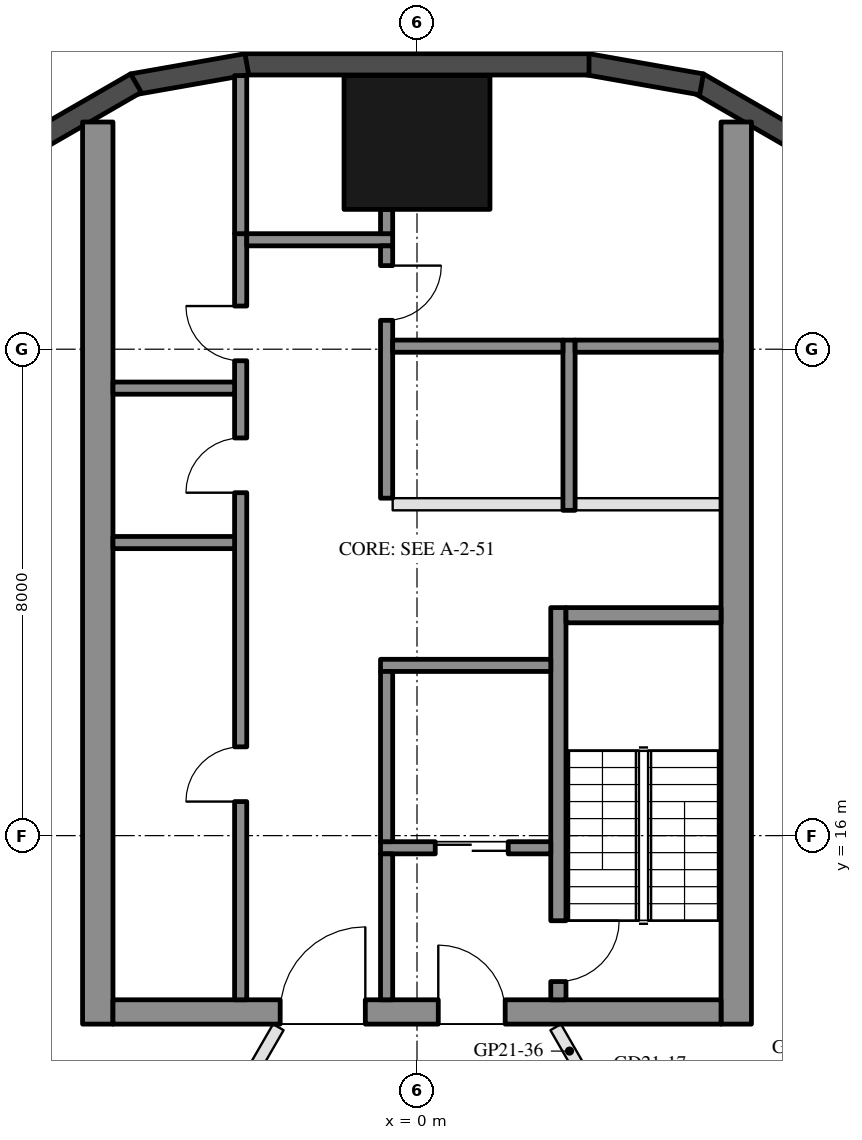
"""IFC4 building model, lengths in metres.
Left out: names, types, materials, properties, quantities, classifications, styles, units other than length and angle.
Written with IfcOpenShell. Run it as: python <this file> out.ifc"""

import sys

from ifc_helpers import new_model, si_unit, direction, frame, frame_2d, origin, origin_2d, place, context, subcontext, project, spatial, rectangle, hollow_rectangle, extrude, element, fill, save


model = new_model("IFC4")
c1 = context("Model", 3, precision=1e-05, world=origin(), true_north=direction((0.0, 1.0)))
c2 = subcontext(c1, "Body", "Model", "MODEL_VIEW")
j1 = project(units=[si_unit("LENGTHUNIT", "METRE"), si_unit("PLANEANGLEUNIT", "RADIAN")], contexts=[c1])
p1 = place(None, origin())
s1 = spatial("IfcSite", under=j1, at=p1, CompositionType="ELEMENT")
p2 = place(p1, origin())
s2 = spatial("IfcBuilding", under=s1, at=p2, CompositionType="ELEMENT")
p3 = place(p2, frame((0.0, 0.0, 220.6)))
s3 = spatial("IfcBuildingStorey", under=s2, at=p3, CompositionType="ELEMENT", Elevation=220.6)
p4 = place(p3, frame((0.0, 27.4, 0.0), z_axis=(0.0, 0.0, 1.0), x_axis=(1.0, 0.0, 0.0)))
e1 = element("IfcColumn", 1, at=p4, inside=s3, PredefinedType="COLUMN", context=c2, shape_type="SweptSolid", body=[
    extrude(hollow_rectangle(XDim=2.4, YDim=2.2, WallThickness=0.06, at=origin_2d()), origin(), (0.0, 0.0, 1.0), 3.7),
])
for number, where, z_axis, x_axis in (
    (2, (6.277, 27.422, 0.0), (0.0, 0.0, 1.0), (-0.866, 0.5, 0.0)),
    (3, (4.68, 28.356, 0.0), (0.0, 0.0, 1.0), (-0.985, 0.174, 0.0)),
):
    element("IfcWall", number, at=place(p3, frame(where, z_axis=z_axis, x_axis=x_axis)), inside=s3, PredefinedType="SOLIDWALL", context=c2, shape_type="SweptSolid", body=[
        extrude(rectangle(XDim=1.91, YDim=0.35, at=frame_2d((0.955, 0.0))), origin(), (0.0, 0.0, 1.0), 3.55),
    ])
p5 = place(p3, frame((2.829, 28.685, 0.0), z_axis=(0.0, 0.0, 1.0), x_axis=(-1.0, 0.0, 0.0)))
e4 = element("IfcWall", 4, at=p5, inside=s3, PredefinedType="SOLIDWALL", context=c2, shape_type="SweptSolid", body=[
    extrude(rectangle(XDim=5.658, YDim=0.35, at=frame_2d((2.829, 0.0))), origin(), (0.0, 0.0, 1.0), 3.55),
])
for number, where, z_axis, x_axis in (
    (5, (-2.799, 28.688, 0.0), (0.0, 0.0, 1.0), (-0.985, -0.174, 0.0)),
    (6, (-4.623, 28.377, 0.0), (0.0, 0.0, 1.0), (-0.866, -0.5, 0.0)),
):
    element("IfcWall", number, at=place(p3, frame(where, z_axis=z_axis, x_axis=x_axis)), inside=s3, PredefinedType="SOLIDWALL", context=c2, shape_type="SweptSolid", body=[
        extrude(rectangle(XDim=1.91, YDim=0.35, at=frame_2d((0.955, 0.0))), origin(), (0.0, 0.0, 1.0), 3.55),
    ])
for number, where, z_axis, x_axis in (
    (7, (5.25, 12.9, 0.0), (0.0, 0.0, 1.0), (0.0, 1.0, 0.0)),
    (8, (-5.25, 12.9, 0.0), (0.0, 0.0, 1.0), (0.0, 1.0, 0.0)),
):
    element("IfcWall", number, at=place(p3, frame(where, z_axis=z_axis, x_axis=x_axis)), inside=s3, PredefinedType="SHEAR", context=c2, shape_type="SweptSolid", body=[
        extrude(rectangle(XDim=14.837, YDim=0.5, at=frame_2d((7.418, 0.0))), origin(), (0.0, 0.0, 1.0), 3.5),
    ])
p6 = place(p3, frame((5.0, 13.1, 0.0), z_axis=(0.0, 0.0, 1.0), x_axis=(-1.0, 0.0, 0.0)))
e9 = element("IfcWall", 9, at=p6, inside=s3, PredefinedType="SHEAR", context=c2, shape_type="SweptSolid", body=[
    extrude(rectangle(XDim=10.0, YDim=0.4, at=frame_2d((5.0, 0.0))), origin(), (0.0, 0.0, 1.0), 3.5),
])
p7 = place(p6, frame((3.55, 0.0, 0.0)))
e10 = element("IfcOpeningElement", 10, at=p7, cuts=e9, PredefinedType="OPENING", context=c2, shape_type="SweptSolid", body=[
    extrude(rectangle(XDim=1.1, YDim=2.1, at=frame_2d((0.55, 1.05))), frame((0.0, 0.21, 0.0), z_axis=(0.0, -1.0, 0.0), x_axis=(1.0, 0.0, 0.0)), (0.0, 0.0, 1.0), 0.42),
])
p8 = place(p6, frame((5.85, 0.0, 0.0)))
e11 = element("IfcOpeningElement", 11, at=p8, cuts=e9, PredefinedType="OPENING", context=c2, shape_type="SweptSolid", body=[
    extrude(rectangle(XDim=1.4, YDim=2.1, at=frame_2d((0.7, 1.05))), frame((0.0, 0.21, 0.0), z_axis=(0.0, -1.0, 0.0), x_axis=(1.0, 0.0, 0.0)), (0.0, 0.0, 1.0), 0.42),
])
p9 = place(p3, frame((2.325, 13.3, 0.0), z_axis=(0.0, 0.0, 1.0), x_axis=(0.0, 1.0, 0.0)))
e12 = element("IfcWall", 12, at=p9, inside=s3, PredefinedType="SHEAR", context=c2, shape_type="SweptSolid", body=[
    extrude(rectangle(XDim=6.45, YDim=0.25, at=frame_2d((3.225, 0.0))), origin(), (0.0, 0.0, 1.0), 3.5),
])
p10 = place(p9, frame((0.3, 0.0, 0.0)))
e13 = element("IfcOpeningElement", 13, at=p10, cuts=e12, PredefinedType="OPENING", context=c2, shape_type="SweptSolid", body=[
    extrude(rectangle(XDim=1.0, YDim=2.1, at=frame_2d((0.5, 1.05))), frame((0.0, 0.135, 0.0), z_axis=(0.0, -1.0, 0.0), x_axis=(1.0, 0.0, 0.0)), (0.0, 0.0, 1.0), 0.27),
])
p11 = place(p3, frame((5.0, 19.625, 0.0), z_axis=(0.0, 0.0, 1.0), x_axis=(-1.0, 0.0, 0.0)))
e14 = element("IfcWall", 14, at=p11, inside=s3, PredefinedType="SHEAR", context=c2, shape_type="SweptSolid", body=[
    extrude(rectangle(XDim=2.55, YDim=0.25, at=frame_2d((1.275, 0.0))), origin(), (0.0, 0.0, 1.0), 3.5),
])
p12 = place(p3, frame((2.2, 18.8, 0.0), z_axis=(0.0, 0.0, 1.0), x_axis=(-1.0, 0.0, 0.0)))
e15 = element("IfcWall", 15, at=p12, inside=s3, PredefinedType="SHEAR", context=c2, shape_type="SweptSolid", body=[
    extrude(rectangle(XDim=2.8, YDim=0.2, at=frame_2d((1.4, 0.0))), origin(), (0.0, 0.0, 1.0), 3.5),
])
p13 = place(p3, frame((2.2, 15.8, 0.0), z_axis=(0.0, 0.0, 1.0), x_axis=(-1.0, 0.0, 0.0)))
e16 = element("IfcWall", 16, at=p13, inside=s3, PredefinedType="SHEAR", context=c2, shape_type="SweptSolid", body=[
    extrude(rectangle(XDim=2.8, YDim=0.2, at=frame_2d((1.4, 0.0))), origin(), (0.0, 0.0, 1.0), 3.5),
])
p14 = place(p13, frame((0.7, 0.0, 0.0)))
e17 = element("IfcOpeningElement", 17, at=p14, cuts=e16, PredefinedType="OPENING", context=c2, shape_type="SweptSolid", body=[
    extrude(rectangle(XDim=1.2, YDim=2.1, at=frame_2d((0.6, 1.05))), frame((0.0, 0.11, 0.0), z_axis=(0.0, -1.0, 0.0), x_axis=(1.0, 0.0, 0.0)), (0.0, 0.0, 1.0), 0.22),
])
p15 = place(p3, frame((-0.5, 15.9, 0.0), z_axis=(0.0, 0.0, 1.0), x_axis=(0.0, 1.0, 0.0)))
e18 = element("IfcWall", 18, at=p15, inside=s3, PredefinedType="SHEAR", context=c2, shape_type="SweptSolid", body=[
    extrude(rectangle(XDim=2.8, YDim=0.2, at=frame_2d((1.4, 0.0))), origin(), (0.0, 0.0, 1.0), 3.5),
])
p16 = place(p3, frame((-0.5, 13.3, 0.0), z_axis=(0.0, 0.0, 1.0), x_axis=(0.0, 1.0, 0.0)))
e19 = element("IfcWall", 19, at=p16, inside=s3, PredefinedType="SHEAR", context=c2, shape_type="SweptSolid", body=[
    extrude(rectangle(XDim=2.4, YDim=0.2, at=frame_2d((1.2, 0.0))), origin(), (0.0, 0.0, 1.0), 3.5),
])
p17 = place(p3, frame((-2.9, 13.3, 0.0), z_axis=(0.0, 0.0, 1.0), x_axis=(0.0, 1.0, 0.0)))
e20 = element("IfcWall", 20, at=p17, inside=s3, PredefinedType="SHEAR", context=c2, shape_type="SweptSolid", body=[
    extrude(rectangle(XDim=12.6, YDim=0.2, at=frame_2d((6.3, 0.0))), origin(), (0.0, 0.0, 1.0), 3.5),
])
p18 = place(p17, frame((3.26, 0.0, 0.0)))
e21 = element("IfcOpeningElement", 21, at=p18, cuts=e20, PredefinedType="OPENING", context=c2, shape_type="SweptSolid", body=[
    extrude(rectangle(XDim=0.9, YDim=2.1, at=frame_2d((0.45, 1.05))), frame((0.0, 0.11, 0.0), z_axis=(0.0, -1.0, 0.0), x_axis=(1.0, 0.0, 0.0)), (0.0, 0.0, 1.0), 0.22),
])
p19 = place(p17, frame((8.34, 0.0, 0.0)))
e22 = element("IfcOpeningElement", 22, at=p19, cuts=e20, PredefinedType="OPENING", context=c2, shape_type="SweptSolid", body=[
    extrude(rectangle(XDim=0.9, YDim=2.1, at=frame_2d((0.45, 1.05))), frame((0.0, 0.11, 0.0), z_axis=(0.0, -1.0, 0.0), x_axis=(1.0, 0.0, 0.0)), (0.0, 0.0, 1.0), 0.22),
])
p20 = place(p17, frame((10.51, 0.0, 0.0)))
e23 = element("IfcOpeningElement", 23, at=p20, cuts=e20, PredefinedType="OPENING", context=c2, shape_type="SweptSolid", body=[
    extrude(rectangle(XDim=0.9, YDim=2.1, at=frame_2d((0.45, 1.05))), frame((0.0, 0.11, 0.0), z_axis=(0.0, -1.0, 0.0), x_axis=(1.0, 0.0, 0.0)), (0.0, 0.0, 1.0), 0.22),
])
p21 = place(p3, frame((-0.4, 25.8, 0.0), z_axis=(0.0, 0.0, 1.0), x_axis=(-1.0, 0.0, 0.0)))
e24 = element("IfcWall", 24, at=p21, inside=s3, PredefinedType="SHEAR", context=c2, shape_type="SweptSolid", body=[
    extrude(rectangle(XDim=2.4, YDim=0.2, at=frame_2d((1.2, 0.0))), origin(), (0.0, 0.0, 1.0), 3.5),
])
p22 = place(p3, frame((-0.5, 21.55, 0.0), z_axis=(0.0, 0.0, 1.0), x_axis=(0.0, 1.0, 0.0)))
e25 = element("IfcWall", 25, at=p22, inside=s3, PredefinedType="SHEAR", context=c2, shape_type="SweptSolid", body=[
    extrude(rectangle(XDim=4.15, YDim=0.2, at=frame_2d((2.075, 0.0))), origin(), (0.0, 0.0, 1.0), 3.5),
])
p23 = place(p22, frame((2.925, 0.0, 0.0)))
e26 = element("IfcOpeningElement", 26, at=p23, cuts=e25, PredefinedType="OPENING", context=c2, shape_type="SweptSolid", body=[
    extrude(rectangle(XDim=0.9, YDim=2.1, at=frame_2d((0.45, 1.05))), frame((0.0, 0.11, 0.0), z_axis=(0.0, -1.0, 0.0), x_axis=(1.0, 0.0, 0.0)), (0.0, 0.0, 1.0), 0.22),
])
for number, where, z_axis, x_axis in (
    (27, (-3.0, 20.82, 0.0), (0.0, 0.0, 1.0), (-1.0, 0.0, 0.0)),
    (28, (-3.0, 23.36, 0.0), (0.0, 0.0, 1.0), (-1.0, 0.0, 0.0)),
):
    element("IfcWall", number, at=place(p3, frame(where, z_axis=z_axis, x_axis=x_axis)), inside=s3, PredefinedType="SHEAR", context=c2, shape_type="SweptSolid", body=[
        extrude(rectangle(XDim=2.0, YDim=0.2, at=frame_2d((1.0, 0.0))), origin(), (0.0, 0.0, 1.0), 3.5),
    ])
p24 = place(p3, frame((-0.5, 25.9, 0.0), z_axis=(0.0, 0.0, 1.0), x_axis=(0.0, 1.0, 0.0)))
e29 = element("IfcWall", 29, at=p24, inside=s3, PredefinedType="SHEAR", context=c2, shape_type="SweptSolid", body=[
    extrude(rectangle(XDim=0.4, YDim=0.2, at=frame_2d((0.2, 0.0))), origin(), (0.0, 0.0, 1.0), 3.5),
])
p25 = place(p3, frame((-2.9, 25.9, 0.0), z_axis=(0.0, 0.0, 1.0), x_axis=(0.0, 1.0, 0.0)))
e30 = element("IfcWall", 30, at=p25, inside=s3, PredefinedType="SHEAR", context=c2, shape_type="SweptSolid", body=[
    extrude(rectangle(XDim=2.6, YDim=0.2, at=frame_2d((1.3, 0.0))), origin(), (0.0, 0.0, 1.0), 3.5),
])
p26 = place(p3, frame((2.5, 21.35, 0.0), z_axis=(0.0, 0.0, 1.0), x_axis=(0.0, 1.0, 0.0)))
e31 = element("IfcWall", 31, at=p26, inside=s3, PredefinedType="SHEAR", context=c2, shape_type="SweptSolid", body=[
    extrude(rectangle(XDim=2.8, YDim=0.2, at=frame_2d((1.4, 0.0))), origin(), (0.0, 0.0, 1.0), 3.5),
])
p27 = place(p3, frame((5.0, 24.05, 0.0), z_axis=(0.0, 0.0, 1.0), x_axis=(-1.0, 0.0, 0.0)))
e32 = element("IfcWall", 32, at=p27, inside=s3, PredefinedType="SHEAR", context=c2, shape_type="SweptSolid", body=[
    extrude(rectangle(XDim=2.4, YDim=0.2, at=frame_2d((1.2, 0.0))), origin(), (0.0, 0.0, 1.0), 3.5),
])
p28 = place(p3, frame((2.4, 24.05, 0.0), z_axis=(0.0, 0.0, 1.0), x_axis=(-1.0, 0.0, 0.0)))
e33 = element("IfcWall", 33, at=p28, inside=s3, PredefinedType="SHEAR", context=c2, shape_type="SweptSolid", body=[
    extrude(rectangle(XDim=2.8, YDim=0.2, at=frame_2d((1.4, 0.0))), origin(), (0.0, 0.0, 1.0), 3.5),
])
p29 = place(p3, frame((5.0, 21.45, 0.0), z_axis=(0.0, 0.0, 1.0), x_axis=(-1.0, 0.0, 0.0)))
e34 = element("IfcWall", 34, at=p29, inside=s3, PredefinedType="PARTITIONING", context=c2, shape_type="SweptSolid", body=[
    extrude(rectangle(XDim=2.4, YDim=0.2, at=frame_2d((1.2, 0.0))), origin(), (0.0, 0.0, 1.0), 3.5),
])
p30 = place(p3, frame((2.4, 21.45, 0.0), z_axis=(0.0, 0.0, 1.0), x_axis=(-1.0, 0.0, 0.0)))
e35 = element("IfcWall", 35, at=p30, inside=s3, PredefinedType="PARTITIONING", context=c2, shape_type="SweptSolid", body=[
    extrude(rectangle(XDim=2.8, YDim=0.2, at=frame_2d((1.4, 0.0))), origin(), (0.0, 0.0, 1.0), 3.5),
])
p31 = place(p3, frame((13.647, 14.923, 0.0), z_axis=(0.0, 0.0, 1.0), x_axis=(-0.866027479907, -0.499996404033, 0.0)))
e36 = element("IfcWall", 36, at=p31, inside=s3, PredefinedType="PARTITIONING", context=c2, shape_type="SweptSolid", body=[
    extrude(rectangle(XDim=10.98, YDim=0.2, at=frame_2d((5.49, 0.0))), origin(), (0.0, 0.0, 1.0), 3.06),
])
p32 = place(p3, frame((-13.672, 13.08, 0.0), z_axis=(0.0, 0.0, 1.0), x_axis=(0.912311972773, -0.409495866077, 0.0)))
e37 = element("IfcWall", 37, at=p32, inside=s3, PredefinedType="PARTITIONING", context=c2, shape_type="SweptSolid", body=[
    extrude(rectangle(XDim=10.132, YDim=0.2, at=frame_2d((5.066, 0.0))), origin(), (0.0, 0.0, 1.0), 3.06),
])
p33 = place(p3, frame((2.281, 12.85, 0.0), z_axis=(0.0, 0.0, 1.0), x_axis=(0.499979074716, -0.866037484666, 0.0)))
e38 = element("IfcWall", 38, at=p33, inside=s3, PredefinedType="PARTITIONING", context=c2, shape_type="SweptSolid", body=[
    extrude(rectangle(XDim=3.788, YDim=0.2, at=frame_2d((1.894, 0.0))), origin(), (0.0, 0.0, 1.0), 2.95),
])
p34 = place(p33, frame((1.394, 0.0, 0.0)))
e39 = element("IfcOpeningElement", 39, at=p34, cuts=e38, PredefinedType="OPENING", context=c2, shape_type="SweptSolid", body=[
    extrude(rectangle(XDim=1.0, YDim=2.1, at=frame_2d((0.5, 1.05))), frame((0.0, 0.11, 0.0), z_axis=(0.0, -1.0, 0.0), x_axis=(1.0, 0.0, 0.0)), (0.0, 0.0, 1.0), 0.22),
])
p35 = place(p3, frame((-4.469, 9.059, 0.0), z_axis=(0.0, 0.0, 1.0), x_axis=(0.499996027077, 0.86602769754, 0.0)))
e40 = element("IfcWall", 40, at=p35, inside=s3, PredefinedType="PARTITIONING", context=c2, shape_type="SweptSolid", body=[
    extrude(rectangle(XDim=4.377, YDim=0.2, at=frame_2d((2.189, 0.0))), origin(), (0.0, 0.0, 1.0), 2.95),
])
p36 = place(p35, frame((1.689, 0.0, 0.0)))
e41 = element("IfcOpeningElement", 41, at=p36, cuts=e40, PredefinedType="OPENING", context=c2, shape_type="SweptSolid", body=[
    extrude(rectangle(XDim=1.0, YDim=2.1, at=frame_2d((0.5, 1.05))), frame((0.0, 0.11, 0.0), z_axis=(0.0, -1.0, 0.0), x_axis=(1.0, 0.0, 0.0)), (0.0, 0.0, 1.0), 0.22),
])
p37 = place(p14, origin())
e42 = element("IfcDoor", 42, at=p37, inside=s3, OperationType="DOUBLE_DOOR_SLIDING", PredefinedType="DOOR", context=c2, shape_type="SweptSolid", body=[
    extrude(rectangle(XDim=1.2, YDim=2.1, at=frame_2d((0.6, 1.05))), frame((0.0, 0.025, 0.0), z_axis=(0.0, -1.0, 0.0), x_axis=(1.0, 0.0, 0.0)), (0.0, 0.0, 1.0), 0.05),
])
fill(e17, e42)
p38 = place(p18, origin())
e43 = element("IfcDoor", 43, at=p38, inside=s3, OperationType="SINGLE_SWING_LEFT", PredefinedType="DOOR", context=c2, shape_type="SweptSolid", body=[
    extrude(rectangle(XDim=0.9, YDim=2.1, at=frame_2d((0.45, 1.05))), frame((0.0, 0.025, 0.0), z_axis=(0.0, -1.0, 0.0), x_axis=(1.0, 0.0, 0.0)), (0.0, 0.0, 1.0), 0.05),
])
fill(e21, e43)
p39 = place(p19, origin())
e44 = element("IfcDoor", 44, at=p39, inside=s3, OperationType="SINGLE_SWING_LEFT", PredefinedType="DOOR", context=c2, shape_type="SweptSolid", body=[
    extrude(rectangle(XDim=0.9, YDim=2.1, at=frame_2d((0.45, 1.05))), frame((0.0, 0.025, 0.0), z_axis=(0.0, -1.0, 0.0), x_axis=(1.0, 0.0, 0.0)), (0.0, 0.0, 1.0), 0.05),
])
fill(e22, e44)
p40 = place(p20, origin())
e45 = element("IfcDoor", 45, at=p40, inside=s3, OperationType="SINGLE_SWING_RIGHT", PredefinedType="DOOR", context=c2, shape_type="SweptSolid", body=[
    extrude(rectangle(XDim=0.9, YDim=2.1, at=frame_2d((0.45, 1.05))), frame((0.0, 0.025, 0.0), z_axis=(0.0, -1.0, 0.0), x_axis=(1.0, 0.0, 0.0)), (0.0, 0.0, 1.0), 0.05),
])
fill(e23, e45)
p41 = place(p23, frame((0.9, 0.0, 0.0), z_axis=(0.0, 0.0, 1.0), x_axis=(-1.0, 0.0, 0.0)))
e46 = element("IfcDoor", 46, at=p41, inside=s3, OperationType="SINGLE_SWING_LEFT", PredefinedType="DOOR", context=c2, shape_type="SweptSolid", body=[
    extrude(rectangle(XDim=0.9, YDim=2.1, at=frame_2d((0.45, 1.05))), frame((0.0, 0.025, 0.0), z_axis=(0.0, -1.0, 0.0), x_axis=(1.0, 0.0, 0.0)), (0.0, 0.0, 1.0), 0.05),
])
fill(e26, e46)
p42 = place(p7, frame((1.1, 0.0, 0.0), z_axis=(0.0, 0.0, 1.0), x_axis=(-1.0, 0.0, 0.0)))
e47 = element("IfcDoor", 47, at=p42, inside=s3, OperationType="SINGLE_SWING_LEFT", PredefinedType="DOOR", context=c2, shape_type="SweptSolid", body=[
    extrude(rectangle(XDim=1.1, YDim=2.1, at=frame_2d((0.55, 1.05))), frame((0.0, 0.025, 0.0), z_axis=(0.0, -1.0, 0.0), x_axis=(1.0, 0.0, 0.0)), (0.0, 0.0, 1.0), 0.05),
])
fill(e10, e47)
p43 = place(p8, frame((1.4, 0.0, 0.0), z_axis=(0.0, 0.0, 1.0), x_axis=(-1.0, 0.0, 0.0)))
e48 = element("IfcDoor", 48, at=p43, inside=s3, OperationType="DOUBLE_DOOR_SINGLE_SWING", PredefinedType="DOOR", context=c2, shape_type="SweptSolid", body=[
    extrude(rectangle(XDim=1.4, YDim=2.1, at=frame_2d((0.7, 1.05))), frame((0.0, 0.025, 0.0), z_axis=(0.0, -1.0, 0.0), x_axis=(1.0, 0.0, 0.0)), (0.0, 0.0, 1.0), 0.05),
])
fill(e11, e48)
p44 = place(p10, frame((1.0, 0.0, 0.0), z_axis=(0.0, 0.0, 1.0), x_axis=(-1.0, 0.0, 0.0)))
e49 = element("IfcDoor", 49, at=p44, inside=s3, OperationType="SINGLE_SWING_LEFT", PredefinedType="DOOR", context=c2, shape_type="SweptSolid", body=[
    extrude(rectangle(XDim=1.0, YDim=2.1, at=frame_2d((0.5, 1.05))), frame((0.0, 0.025, 0.0), z_axis=(0.0, -1.0, 0.0), x_axis=(1.0, 0.0, 0.0)), (0.0, 0.0, 1.0), 0.05),
])
fill(e13, e49)
save(model, sys.argv[1])
